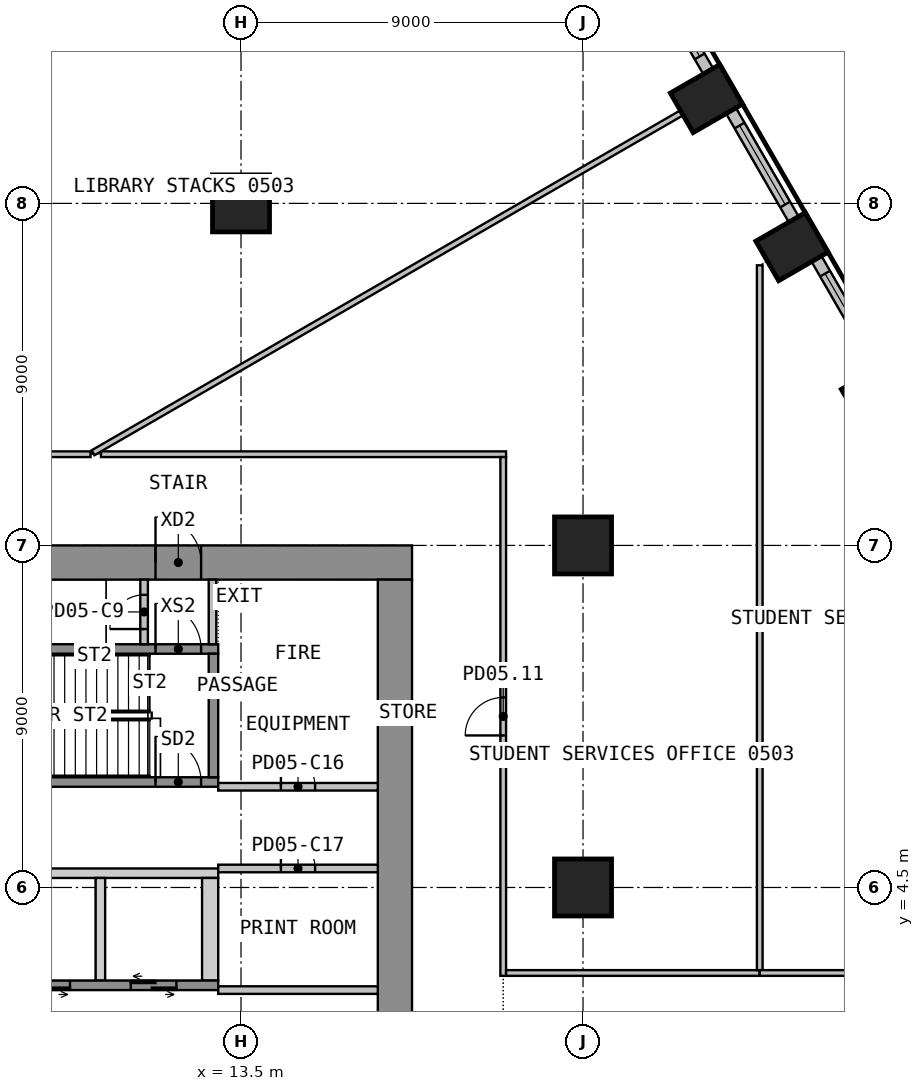
"""IFC4 building model, lengths in metres.
Left out: names, types, materials, properties, quantities, classifications, styles, units other than length and angle.
Written with IfcOpenShell. Run it as: python <this file> out.ifc"""

import sys

from ifc_helpers import new_model, si_unit, direction, frame, frame_2d, origin, origin_2d, place, context, subcontext, project, spatial, polyline, rectangle, circle, outline, extrude, element, fill, save


model = new_model("IFC4")
c1 = context("Model", 3, precision=1e-05, world=origin(), true_north=direction((0.0, 1.0)))
c2 = subcontext(c1, "Body", "Model", "MODEL_VIEW")
j1 = project(units=[si_unit("LENGTHUNIT", "METRE"), si_unit("PLANEANGLEUNIT", "RADIAN")], contexts=[c1])
p1 = place(None, origin())
s1 = spatial("IfcSite", under=j1, at=p1, CompositionType="ELEMENT")
p2 = place(p1, origin())
s2 = spatial("IfcBuilding", under=s1, at=p2, CompositionType="ELEMENT")
p3 = place(p2, frame((0.0, 0.0, 25.2)))
s3 = spatial("IfcBuildingStorey", under=s2, at=p3, CompositionType="ELEMENT", Elevation=25.2)
for number, where, z_axis, x_axis in (
    (1, (30.248, 17.463, 0.0), (0.0, 0.0, 1.0), (-0.5, 0.866, 0.0)),
    (2, (27.998, 21.361, 0.0), (0.0, 0.0, 1.0), (-0.5, 0.866, 0.0)),
    (3, (25.748, 25.258, 0.0), (0.0, 0.0, 1.0), (-0.5, 0.866, 0.0)),
):
    element("IfcColumn", number, at=place(p3, frame(where, z_axis=z_axis, x_axis=x_axis)), inside=s3, PredefinedType="COLUMN", context=c2, shape_type="SweptSolid", body=[
        extrude(rectangle(XDim=1.2, YDim=1.5, at=origin_2d()), origin(), (0.0, 0.0, 1.0), 4.425),
    ])
for number, where, z_axis, x_axis in (
    (4, (13.5, 22.5, 0.0), (0.0, 0.0, 1.0), (1.0, 0.0, 0.0)),
    (5, (22.5, 4.5, 0.0), (0.0, 0.0, 1.0), (1.0, 0.0, 0.0)),
    (6, (22.5, 13.5, 0.0), (0.0, 0.0, 1.0), (1.0, 0.0, 0.0)),
):
    element("IfcColumn", number, at=place(p3, frame(where, z_axis=z_axis, x_axis=x_axis)), inside=s3, PredefinedType="COLUMN", context=c2, shape_type="SweptSolid", body=[
        extrude(circle(Radius=0.75, at=origin_2d()), origin(), (0.0, 0.0, 1.0), 4.425),
    ])
p4 = place(p3, frame((30.294, 18.184, 0.0), z_axis=(0.0, 0.0, 1.0), x_axis=(-0.499991515992, 0.866030301974, 0.0)))
e7 = element("IfcWall", 7, at=p4, inside=s3, PredefinedType="SOLIDWALL", context=c2, shape_type="SweptSolid", body=[
    extrude(rectangle(XDim=3.299, YDim=0.3, at=frame_2d((1.649, 0.0))), origin(), (0.0, 0.0, 1.0), 4.425),
])
p5 = place(p4, frame((0.449, 0.0, 0.9)))
e8 = element("IfcOpeningElement", 8, at=p5, cuts=e7, PredefinedType="OPENING", context=c2, shape_type="SweptSolid", body=[
    extrude(rectangle(XDim=2.4, YDim=3.0, at=frame_2d((1.2, 1.5))), frame((0.0, 0.16, 0.0), z_axis=(0.0, -1.0, 0.0), x_axis=(1.0, 0.0, 0.0)), (0.0, 0.0, 1.0), 0.32),
])
p6 = place(p3, frame((28.044, 22.081, 0.0), z_axis=(0.0, 0.0, 1.0), x_axis=(-0.499991515992, 0.866030301974, 0.0)))
e9 = element("IfcWall", 9, at=p6, inside=s3, PredefinedType="SOLIDWALL", context=c2, shape_type="SweptSolid", body=[
    extrude(rectangle(XDim=3.299, YDim=0.3, at=frame_2d((1.649, 0.0))), origin(), (0.0, 0.0, 1.0), 4.425),
])
p7 = place(p6, frame((0.449, 0.0, 0.9)))
e10 = element("IfcOpeningElement", 10, at=p7, cuts=e9, PredefinedType="OPENING", context=c2, shape_type="SweptSolid", body=[
    extrude(rectangle(XDim=2.4, YDim=3.0, at=frame_2d((1.2, 1.5))), frame((0.0, 0.16, 0.0), z_axis=(0.0, -1.0, 0.0), x_axis=(1.0, 0.0, 0.0)), (0.0, 0.0, 1.0), 0.32),
])
p8 = place(p3, frame((25.794, 25.978, 0.0), z_axis=(0.0, 0.0, 1.0), x_axis=(-0.49999586137, 0.866027793211, 0.0)))
e11 = element("IfcWall", 11, at=p8, inside=s3, PredefinedType="SOLIDWALL", context=c2, shape_type="SweptSolid", body=[
    extrude(rectangle(XDim=2.989, YDim=0.3, at=frame_2d((1.494, 0.0))), origin(), (0.0, 0.0, 1.0), 4.425),
])
p9 = place(p8, frame((0.449, 0.0, 0.9)))
e12 = element("IfcOpeningElement", 12, at=p9, cuts=e11, PredefinedType="OPENING", context=c2, shape_type="SweptSolid", body=[
    extrude(rectangle(XDim=2.4, YDim=3.0, at=frame_2d((1.2, 1.5))), frame((0.0, 0.16, 0.0), z_axis=(0.0, -1.0, 0.0), x_axis=(1.0, 0.0, 0.0)), (0.0, 0.0, 1.0), 0.32),
])
p10 = place(p3, frame((-18.0, 13.05, 0.0), z_axis=(0.0, 0.0, 1.0), x_axis=(1.0, 0.0, 0.0)))
e13 = element("IfcWall", 13, at=p10, inside=s3, PredefinedType="SHEAR", context=c2, shape_type="SweptSolid", body=[
    extrude(rectangle(XDim=36.0, YDim=0.9, at=frame_2d((18.0, 0.0))), origin(), (0.0, 0.0, 1.0), 4.425),
])
p11 = place(p10, frame((16.8, 0.0, 0.0)))
e14 = element("IfcOpeningElement", 14, at=p11, cuts=e13, PredefinedType="OPENING", context=c2, shape_type="SweptSolid", body=[
    extrude(rectangle(XDim=2.4, YDim=2.1, at=frame_2d((1.2, 1.05))), frame((0.0, 0.46, 0.0), z_axis=(0.0, -1.0, 0.0), x_axis=(1.0, 0.0, 0.0)), (0.0, 0.0, 1.0), 0.92),
])
p12 = place(p10, frame((5.55, 0.0, 0.0)))
e15 = element("IfcOpeningElement", 15, at=p12, cuts=e13, PredefinedType="OPENING", context=c2, shape_type="SweptSolid", body=[
    extrude(rectangle(XDim=1.2, YDim=2.1, at=frame_2d((0.6, 1.05))), frame((0.0, 0.46, 0.0), z_axis=(0.0, -1.0, 0.0), x_axis=(1.0, 0.0, 0.0)), (0.0, 0.0, 1.0), 0.92),
])
p13 = place(p10, frame((29.25, 0.0, 0.0)))
e16 = element("IfcOpeningElement", 16, at=p13, cuts=e13, PredefinedType="OPENING", context=c2, shape_type="SweptSolid", body=[
    extrude(rectangle(XDim=1.2, YDim=2.1, at=frame_2d((0.6, 1.05))), frame((0.0, 0.46, 0.0), z_axis=(0.0, -1.0, 0.0), x_axis=(1.0, 0.0, 0.0)), (0.0, 0.0, 1.0), 0.92),
])
p14 = place(p3, frame((17.55, -12.6, 0.0), z_axis=(0.0, 0.0, 1.0), x_axis=(0.0, 1.0, 0.0)))
e17 = element("IfcWall", 17, at=p14, inside=s3, PredefinedType="SHEAR", context=c2, shape_type="SweptSolid", body=[
    extrude(rectangle(XDim=25.2, YDim=0.9, at=frame_2d((12.6, 0.0))), origin(), (0.0, 0.0, 1.0), 4.425),
])
p15 = place(p14, frame((11.4, 0.0, 0.0)))
e18 = element("IfcOpeningElement", 18, at=p15, cuts=e17, PredefinedType="OPENING", context=c2, shape_type="SweptSolid", body=[
    extrude(rectangle(XDim=2.4, YDim=2.1, at=frame_2d((1.2, 1.05))), frame((0.0, 0.46, 0.0), z_axis=(0.0, -1.0, 0.0), x_axis=(1.0, 0.0, 0.0)), (0.0, 0.0, 1.0), 0.92),
])
p16 = place(p3, origin())
e19 = element("IfcWall", 19, at=p16, inside=s3, PredefinedType="SHEAR", context=c2, shape_type="SweptSolid", body=[
    extrude(outline(polyline([(-12.9, 4.75), (12.9, 4.75), (12.9, 5.0), (-12.9, 5.0), (-12.9, 4.75)])), origin(), (0.0, 0.0, 1.0), 4.425),
])
p17 = place(p3, origin())
e20 = element("IfcWall", 20, at=p17, inside=s3, PredefinedType="SHEAR", context=c2, shape_type="SweptSolid", body=[
    extrude(outline(polyline([(9.675, 2.05), (9.925, 2.05), (9.925, 4.75), (9.675, 4.75), (9.675, 2.05)])), origin(), (0.0, 0.0, 1.0), 4.425),
])
p18 = place(p3, origin())
e21 = element("IfcWall", 21, at=p18, inside=s3, PredefinedType="SHEAR", context=c2, shape_type="SweptSolid", body=[
    extrude(outline(polyline([(12.475, 2.05), (12.9, 2.05), (12.9, 4.75), (12.475, 4.75), (12.475, 2.05)])), origin(), (0.0, 0.0, 1.0), 4.425),
])
p19 = place(p3, frame((-12.9, 1.925, 0.0), z_axis=(0.0, 0.0, 1.0), x_axis=(1.0, 0.0, 0.0)))
e22 = element("IfcWall", 22, at=p19, inside=s3, PredefinedType="SHEAR", context=c2, shape_type="SweptSolid", body=[
    extrude(rectangle(XDim=25.8, YDim=0.25, at=frame_2d((12.9, 0.0))), origin(), (0.0, 0.0, 1.0), 4.425),
])
p20 = place(p19, frame((9.5, 0.0, 0.0)))
e23 = element("IfcOpeningElement", 23, at=p20, cuts=e22, PredefinedType="OPENING", context=c2, shape_type="SweptSolid", body=[
    extrude(rectangle(XDim=1.2, YDim=2.1, at=frame_2d((0.6, 1.05))), frame((0.0, 0.135, 0.0), z_axis=(0.0, -1.0, 0.0), x_axis=(1.0, 0.0, 0.0)), (0.0, 0.0, 1.0), 0.27),
])
p21 = place(p19, frame((12.3, 0.0, 0.0)))
e24 = element("IfcOpeningElement", 24, at=p21, cuts=e22, PredefinedType="OPENING", context=c2, shape_type="SweptSolid", body=[
    extrude(rectangle(XDim=1.2, YDim=2.1, at=frame_2d((0.6, 1.05))), frame((0.0, 0.135, 0.0), z_axis=(0.0, -1.0, 0.0), x_axis=(1.0, 0.0, 0.0)), (0.0, 0.0, 1.0), 0.27),
])
p22 = place(p19, frame((15.1, 0.0, 0.0)))
e25 = element("IfcOpeningElement", 25, at=p22, cuts=e22, PredefinedType="OPENING", context=c2, shape_type="SweptSolid", body=[
    extrude(rectangle(XDim=1.2, YDim=2.1, at=frame_2d((0.6, 1.05))), frame((0.0, 0.135, 0.0), z_axis=(0.0, -1.0, 0.0), x_axis=(1.0, 0.0, 0.0)), (0.0, 0.0, 1.0), 0.27),
])
p23 = place(p19, frame((17.9, 0.0, 0.0)))
e26 = element("IfcOpeningElement", 26, at=p23, cuts=e22, PredefinedType="OPENING", context=c2, shape_type="SweptSolid", body=[
    extrude(rectangle(XDim=1.2, YDim=2.1, at=frame_2d((0.6, 1.05))), frame((0.0, 0.135, 0.0), z_axis=(0.0, -1.0, 0.0), x_axis=(1.0, 0.0, 0.0)), (0.0, 0.0, 1.0), 0.27),
])
p24 = place(p19, frame((20.7, 0.0, 0.0)))
e27 = element("IfcOpeningElement", 27, at=p24, cuts=e22, PredefinedType="OPENING", context=c2, shape_type="SweptSolid", body=[
    extrude(rectangle(XDim=1.2, YDim=2.1, at=frame_2d((0.6, 1.05))), frame((0.0, 0.135, 0.0), z_axis=(0.0, -1.0, 0.0), x_axis=(1.0, 0.0, 0.0)), (0.0, 0.0, 1.0), 0.27),
])
p25 = place(p19, frame((23.5, 0.0, 0.0)))
e28 = element("IfcOpeningElement", 28, at=p25, cuts=e22, PredefinedType="OPENING", context=c2, shape_type="SweptSolid", body=[
    extrude(rectangle(XDim=1.2, YDim=2.1, at=frame_2d((0.6, 1.05))), frame((0.0, 0.135, 0.0), z_axis=(0.0, -1.0, 0.0), x_axis=(1.0, 0.0, 0.0)), (0.0, 0.0, 1.0), 0.27),
])
p26 = place(p3, frame((2.8, 7.275, 0.0), z_axis=(0.0, 0.0, 1.0), x_axis=(1.0, 0.0, 0.0)))
e29 = element("IfcWall", 29, at=p26, inside=s3, PredefinedType="SHEAR", context=c2, shape_type="SweptSolid", body=[
    extrude(rectangle(XDim=10.1, YDim=0.25, at=frame_2d((5.05, 0.0))), origin(), (0.0, 0.0, 1.0), 4.425),
])
p27 = place(p26, frame((8.45, 0.0, 0.0)))
e30 = element("IfcOpeningElement", 30, at=p27, cuts=e29, PredefinedType="OPENING", context=c2, shape_type="SweptSolid", body=[
    extrude(rectangle(XDim=1.2, YDim=2.1, at=frame_2d((0.6, 1.05))), frame((0.0, 0.135, 0.0), z_axis=(0.0, -1.0, 0.0), x_axis=(1.0, 0.0, 0.0)), (0.0, 0.0, 1.0), 0.27),
])
p28 = place(p3, frame((2.8, 10.775, 0.0), z_axis=(0.0, 0.0, 1.0), x_axis=(1.0, 0.0, 0.0)))
e31 = element("IfcWall", 31, at=p28, inside=s3, PredefinedType="SHEAR", context=c2, shape_type="SweptSolid", body=[
    extrude(rectangle(XDim=10.1, YDim=0.25, at=frame_2d((5.05, 0.0))), origin(), (0.0, 0.0, 1.0), 4.425),
])
p29 = place(p28, frame((8.45, 0.0, 0.0)))
e32 = element("IfcOpeningElement", 32, at=p29, cuts=e31, PredefinedType="OPENING", context=c2, shape_type="SweptSolid", body=[
    extrude(rectangle(XDim=1.2, YDim=2.1, at=frame_2d((0.6, 1.05))), frame((0.0, 0.135, 0.0), z_axis=(0.0, -1.0, 0.0), x_axis=(1.0, 0.0, 0.0)), (0.0, 0.0, 1.0), 0.27),
])
p30 = place(p3, frame((12.775, 7.4, 0.0), z_axis=(0.0, 0.0, 1.0), x_axis=(0.0, 1.0, 0.0)))
e33 = element("IfcWall", 33, at=p30, inside=s3, PredefinedType="SHEAR", context=c2, shape_type="SweptSolid", body=[
    extrude(rectangle(XDim=3.25, YDim=0.25, at=frame_2d((1.625, 0.0))), origin(), (0.0, 0.0, 1.0), 4.425),
])
p31 = place(p3, frame((12.75, 10.9, 0.0), z_axis=(0.0, 0.0, 1.0), x_axis=(0.0, 1.0, 0.0)))
e34 = element("IfcWall", 34, at=p31, inside=s3, PredefinedType="PARTITIONING", context=c2, shape_type="SweptSolid", body=[
    extrude(rectangle(XDim=1.7, YDim=0.2, at=frame_2d((0.85, 0.0))), origin(), (0.0, 0.0, 1.0), 4.425),
])
p32 = place(p3, frame((10.95, 10.9, 0.0), z_axis=(0.0, 0.0, 1.0), x_axis=(0.0, 1.0, 0.0)))
e35 = element("IfcWall", 35, at=p32, inside=s3, PredefinedType="PARTITIONING", context=c2, shape_type="SweptSolid", body=[
    extrude(rectangle(XDim=1.7, YDim=0.2, at=frame_2d((0.85, 0.0))), origin(), (0.0, 0.0, 1.0), 4.425),
])
p33 = place(p32, frame((0.4, 0.0, 0.0)))
e36 = element("IfcOpeningElement", 36, at=p33, cuts=e35, PredefinedType="OPENING", context=c2, shape_type="SweptSolid", body=[
    extrude(rectangle(XDim=0.9, YDim=2.1, at=frame_2d((0.45, 1.05))), frame((0.0, 0.11, 0.0), z_axis=(0.0, -1.0, 0.0), x_axis=(1.0, 0.0, 0.0)), (0.0, 0.0, 1.0), 0.22),
])
p34 = place(p3, frame((12.9, 7.15, 0.0), z_axis=(0.0, 0.0, 1.0), x_axis=(1.0, 0.0, 0.0)))
e37 = element("IfcWall", 37, at=p34, inside=s3, PredefinedType="PARTITIONING", context=c2, shape_type="SweptSolid", body=[
    extrude(rectangle(XDim=4.2, YDim=0.2, at=frame_2d((2.1, 0.0))), origin(), (0.0, 0.0, 1.0), 4.425),
])
p35 = place(p34, frame((1.65, 0.0, 0.0)))
e38 = element("IfcOpeningElement", 38, at=p35, cuts=e37, PredefinedType="OPENING", context=c2, shape_type="SweptSolid", body=[
    extrude(rectangle(XDim=0.9, YDim=2.1, at=frame_2d((0.45, 1.05))), frame((0.0, 0.11, 0.0), z_axis=(0.0, -1.0, 0.0), x_axis=(1.0, 0.0, 0.0)), (0.0, 0.0, 1.0), 0.22),
])
p36 = place(p3, frame((12.9, 5.0, 0.0), z_axis=(0.0, 0.0, 1.0), x_axis=(1.0, 0.0, 0.0)))
e39 = element("IfcWall", 39, at=p36, inside=s3, PredefinedType="PARTITIONING", context=c2, shape_type="SweptSolid", body=[
    extrude(rectangle(XDim=4.2, YDim=0.2, at=frame_2d((2.1, 0.0))), origin(), (0.0, 0.0, 1.0), 4.425),
])
p37 = place(p36, frame((1.65, 0.0, 0.0)))
e40 = element("IfcOpeningElement", 40, at=p37, cuts=e39, PredefinedType="OPENING", context=c2, shape_type="SweptSolid", body=[
    extrude(rectangle(XDim=0.9, YDim=2.1, at=frame_2d((0.45, 1.05))), frame((0.0, 0.11, 0.0), z_axis=(0.0, -1.0, 0.0), x_axis=(1.0, 0.0, 0.0)), (0.0, 0.0, 1.0), 0.22),
])
p38 = place(p3, frame((12.9, 1.8, 0.0), z_axis=(0.0, 0.0, 1.0), x_axis=(1.0, 0.0, 0.0)))
e41 = element("IfcWall", 41, at=p38, inside=s3, PredefinedType="PARTITIONING", context=c2, shape_type="SweptSolid", body=[
    extrude(rectangle(XDim=4.2, YDim=0.2, at=frame_2d((2.1, 0.0))), origin(), (0.0, 0.0, 1.0), 4.425),
])
p39 = place(p3, frame((9.54, 15.9, 0.0), z_axis=(0.0, 0.0, 1.0), x_axis=(-1.0, 0.0, 0.0)))
e42 = element("IfcWall", 42, at=p39, inside=s3, PredefinedType="PARTITIONING", context=c2, shape_type="SweptSolid", body=[
    extrude(rectangle(XDim=2.79, YDim=0.15, at=frame_2d((1.395, 0.0))), origin(), (0.0, 0.0, 1.0), 4.425),
])
p40 = place(p3, frame((20.475, 15.9, 0.0), z_axis=(0.0, 0.0, 1.0), x_axis=(-1.0, 0.0, 0.0)))
e43 = element("IfcWall", 43, at=p40, inside=s3, PredefinedType="PARTITIONING", context=c2, shape_type="SweptSolid", body=[
    extrude(rectangle(XDim=10.66, YDim=0.15, at=frame_2d((5.33, 0.0))), origin(), (0.0, 0.0, 1.0), 4.425),
])
p41 = place(p3, frame((25.081, 24.873, 0.0), z_axis=(0.0, 0.0, 1.0), x_axis=(-0.866008122325, -0.500029931171, 0.0)))
e44 = element("IfcWall", 44, at=p41, inside=s3, PredefinedType="PARTITIONING", context=c2, shape_type="SweptSolid", body=[
    extrude(rectangle(XDim=17.87, YDim=0.15, at=frame_2d((8.935, 0.0))), origin(), (0.0, 0.0, 1.0), 4.425),
])
p42 = place(p3, frame((20.4, 2.175, 0.0), z_axis=(0.0, 0.0, 1.0), x_axis=(0.0, 1.0, 0.0)))
e45 = element("IfcWall", 45, at=p42, inside=s3, PredefinedType="PARTITIONING", context=c2, shape_type="SweptSolid", body=[
    extrude(rectangle(XDim=13.65, YDim=0.15, at=frame_2d((6.825, 0.0))), origin(), (0.0, 0.0, 1.0), 4.425),
])
p43 = place(p42, frame((6.325, 0.0, 0.0)))
e46 = element("IfcOpeningElement", 46, at=p43, cuts=e45, PredefinedType="OPENING", context=c2, shape_type="SweptSolid", body=[
    extrude(rectangle(XDim=1.0, YDim=2.1, at=frame_2d((0.5, 1.05))), frame((0.0, 0.085, 0.0), z_axis=(0.0, -1.0, 0.0), x_axis=(1.0, 0.0, 0.0)), (0.0, 0.0, 1.0), 0.17),
])
p44 = place(p3, frame((20.475, 2.25, 0.0), z_axis=(0.0, 0.0, 1.0), x_axis=(1.0, 0.0, 0.0)))
e47 = element("IfcWall", 47, at=p44, inside=s3, PredefinedType="PARTITIONING", context=c2, shape_type="SweptSolid", body=[
    extrude(rectangle(XDim=6.675, YDim=0.15, at=frame_2d((3.337, 0.0))), origin(), (0.0, 0.0, 1.0), 4.425),
])
p45 = place(p3, frame((27.15, 20.871, 0.0), z_axis=(0.0, 0.0, 1.0), x_axis=(0.0, -1.0, 0.0)))
e48 = element("IfcWall", 48, at=p45, inside=s3, PredefinedType="PARTITIONING", context=c2, shape_type="SweptSolid", body=[
    extrude(rectangle(XDim=18.546, YDim=0.15, at=frame_2d((9.273, 0.0))), origin(), (0.0, 0.0, 1.0), 4.425),
])
p46 = place(p3, frame((27.15, 2.25, 0.0), z_axis=(0.0, 0.0, 1.0), x_axis=(1.0, 0.0, 0.0)))
e49 = element("IfcWall", 49, at=p46, inside=s3, PredefinedType="PARTITIONING", context=c2, shape_type="SweptSolid", body=[
    extrude(rectangle(XDim=10.966, YDim=0.15, at=frame_2d((5.483, 0.0))), origin(), (0.0, 0.0, 1.0), 4.425),
])
p47 = place(p46, frame((4.983, 0.0, 0.0)))
e50 = element("IfcOpeningElement", 50, at=p47, cuts=e49, PredefinedType="OPENING", context=c2, shape_type="SweptSolid", body=[
    extrude(rectangle(XDim=1.0, YDim=2.1, at=frame_2d((0.5, 1.05))), frame((0.0, 0.085, 0.0), z_axis=(0.0, -1.0, 0.0), x_axis=(1.0, 0.0, 0.0)), (0.0, 0.0, 1.0), 0.17),
])
p48 = place(p5, origin())
e51 = element("IfcWindow", 51, at=p48, inside=s3, PartitioningType="SINGLE_PANEL", PredefinedType="WINDOW", context=c2, shape_type="SweptSolid", body=[
    extrude(rectangle(XDim=2.4, YDim=3.0, at=frame_2d((1.2, 1.5))), frame((0.0, 0.03, 0.0), z_axis=(0.0, -1.0, 0.0), x_axis=(1.0, 0.0, 0.0)), (0.0, 0.0, 1.0), 0.06),
])
fill(e8, e51)
p49 = place(p7, origin())
e52 = element("IfcWindow", 52, at=p49, inside=s3, PartitioningType="SINGLE_PANEL", PredefinedType="WINDOW", context=c2, shape_type="SweptSolid", body=[
    extrude(rectangle(XDim=2.4, YDim=3.0, at=frame_2d((1.2, 1.5))), frame((0.0, 0.03, 0.0), z_axis=(0.0, -1.0, 0.0), x_axis=(1.0, 0.0, 0.0)), (0.0, 0.0, 1.0), 0.06),
])
fill(e10, e52)
p50 = place(p9, origin())
e53 = element("IfcWindow", 53, at=p50, inside=s3, PartitioningType="SINGLE_PANEL", PredefinedType="WINDOW", context=c2, shape_type="SweptSolid", body=[
    extrude(rectangle(XDim=2.4, YDim=3.0, at=frame_2d((1.2, 1.5))), frame((0.0, 0.03, 0.0), z_axis=(0.0, -1.0, 0.0), x_axis=(1.0, 0.0, 0.0)), (0.0, 0.0, 1.0), 0.06),
])
fill(e12, e53)
p51 = place(p13, origin())
e54 = element("IfcDoor", 54, at=p51, inside=s3, OperationType="SINGLE_SWING_RIGHT", PredefinedType="DOOR", context=c2, shape_type="SweptSolid", body=[
    extrude(rectangle(XDim=1.2, YDim=2.1, at=frame_2d((0.6, 1.05))), frame((0.0, 0.025, 0.0), z_axis=(0.0, -1.0, 0.0), x_axis=(1.0, 0.0, 0.0)), (0.0, 0.0, 1.0), 0.05),
])
fill(e16, e54)
p52 = place(p24, origin())
e55 = element("IfcDoor", 55, at=p52, inside=s3, OperationType="DOUBLE_DOOR_SLIDING", PredefinedType="DOOR", context=c2, shape_type="SweptSolid", body=[
    extrude(rectangle(XDim=1.2, YDim=2.1, at=frame_2d((0.6, 1.05))), frame((0.0, 0.025, 0.0), z_axis=(0.0, -1.0, 0.0), x_axis=(1.0, 0.0, 0.0)), (0.0, 0.0, 1.0), 0.05),
])
fill(e27, e55)
p53 = place(p25, origin())
e56 = element("IfcDoor", 56, at=p53, inside=s3, OperationType="DOUBLE_DOOR_SLIDING", PredefinedType="DOOR", context=c2, shape_type="SweptSolid", body=[
    extrude(rectangle(XDim=1.2, YDim=2.1, at=frame_2d((0.6, 1.05))), frame((0.0, 0.025, 0.0), z_axis=(0.0, -1.0, 0.0), x_axis=(1.0, 0.0, 0.0)), (0.0, 0.0, 1.0), 0.05),
])
fill(e28, e56)
p54 = place(p27, origin())
e57 = element("IfcDoor", 57, at=p54, inside=s3, OperationType="SINGLE_SWING_LEFT", PredefinedType="DOOR", context=c2, shape_type="SweptSolid", body=[
    extrude(rectangle(XDim=1.2, YDim=2.1, at=frame_2d((0.6, 1.05))), frame((0.0, 0.025, 0.0), z_axis=(0.0, -1.0, 0.0), x_axis=(1.0, 0.0, 0.0)), (0.0, 0.0, 1.0), 0.05),
])
fill(e30, e57)
p55 = place(p29, origin())
e58 = element("IfcDoor", 58, at=p55, inside=s3, OperationType="SINGLE_SWING_RIGHT", PredefinedType="DOOR", context=c2, shape_type="SweptSolid", body=[
    extrude(rectangle(XDim=1.2, YDim=2.1, at=frame_2d((0.6, 1.05))), frame((0.0, 0.025, 0.0), z_axis=(0.0, -1.0, 0.0), x_axis=(1.0, 0.0, 0.0)), (0.0, 0.0, 1.0), 0.05),
])
fill(e32, e58)
p56 = place(p33, origin())
e59 = element("IfcDoor", 59, at=p56, inside=s3, OperationType="SINGLE_SWING_LEFT", PredefinedType="DOOR", context=c2, shape_type="SweptSolid", body=[
    extrude(rectangle(XDim=0.9, YDim=2.1, at=frame_2d((0.45, 1.05))), frame((0.0, 0.025, 0.0), z_axis=(0.0, -1.0, 0.0), x_axis=(1.0, 0.0, 0.0)), (0.0, 0.0, 1.0), 0.05),
])
fill(e36, e59)
p57 = place(p35, origin())
e60 = element("IfcDoor", 60, at=p57, inside=s3, OperationType="SINGLE_SWING_LEFT", PredefinedType="DOOR", context=c2, shape_type="SweptSolid", body=[
    extrude(rectangle(XDim=0.9, YDim=2.1, at=frame_2d((0.45, 1.05))), frame((0.0, 0.025, 0.0), z_axis=(0.0, -1.0, 0.0), x_axis=(1.0, 0.0, 0.0)), (0.0, 0.0, 1.0), 0.05),
])
fill(e38, e60)
p58 = place(p37, origin())
e61 = element("IfcDoor", 61, at=p58, inside=s3, OperationType="SINGLE_SWING_LEFT", PredefinedType="DOOR", context=c2, shape_type="SweptSolid", body=[
    extrude(rectangle(XDim=0.9, YDim=2.1, at=frame_2d((0.45, 1.05))), frame((0.0, 0.025, 0.0), z_axis=(0.0, -1.0, 0.0), x_axis=(1.0, 0.0, 0.0)), (0.0, 0.0, 1.0), 0.05),
])
fill(e40, e61)
p59 = place(p43, origin())
e62 = element("IfcDoor", 62, at=p59, inside=s3, OperationType="SINGLE_SWING_LEFT", PredefinedType="DOOR", context=c2, shape_type="SweptSolid", body=[
    extrude(rectangle(XDim=1.0, YDim=2.1, at=frame_2d((0.5, 1.05))), frame((0.0, 0.025, 0.0), z_axis=(0.0, -1.0, 0.0), x_axis=(1.0, 0.0, 0.0)), (0.0, 0.0, 1.0), 0.05),
])
fill(e46, e62)
save(model, sys.argv[1])
